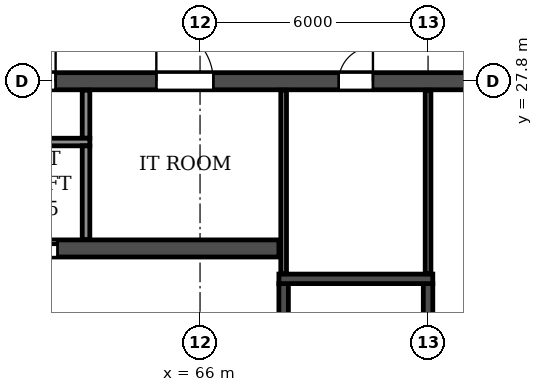
"""IFC4 building model, lengths in metres.
Left out: names, types, materials, properties, quantities, classifications, styles, units other than length and angle.
Written with IfcOpenShell. Run it as: python <this file> out.ifc"""

import sys

from ifc_helpers import new_model, si_unit, direction, frame, frame_2d, origin, place, context, subcontext, project, spatial, rectangle, extrude, element, fill, save


model = new_model("IFC4")
c1 = context("Model", 3, precision=1e-05, world=origin(), true_north=direction((0.0, 1.0)))
c2 = subcontext(c1, "Body", "Model", "MODEL_VIEW")
j1 = project(units=[si_unit("LENGTHUNIT", "METRE"), si_unit("PLANEANGLEUNIT", "RADIAN")], contexts=[c1])
p1 = place(None, origin())
s1 = spatial("IfcSite", under=j1, at=p1, CompositionType="ELEMENT")
p2 = place(p1, origin())
s2 = spatial("IfcBuilding", under=s1, at=p2, CompositionType="ELEMENT")
p3 = place(p2, frame((0.0, 0.0, 125.7)))
s3 = spatial("IfcBuildingStorey", under=s2, at=p3, CompositionType="ELEMENT", Elevation=125.7)
p4 = place(p3, frame((12.2, 27.8, 0.0), z_axis=(0.0, 0.0, 1.0), x_axis=(1.0, 0.0, 0.0)))
e1 = element("IfcWall", 1, at=p4, inside=s3, PredefinedType="SOLIDWALL", context=c2, shape_type="SweptSolid", body=[
    extrude(rectangle(XDim=77.6, YDim=0.45, at=frame_2d((38.8, 0.0))), origin(), (0.0, 0.0, 1.0), 3.07),
])
p5 = place(p4, frame((0.8, 0.0, 0.0)))
e2 = element("IfcOpeningElement", 2, at=p5, cuts=e1, PredefinedType="OPENING", context=c2, shape_type="SweptSolid", body=[
    extrude(rectangle(XDim=1.0, YDim=2.1, at=frame_2d((0.5, 1.05))), frame((0.0, 0.235, 0.0), z_axis=(0.0, -1.0, 0.0), x_axis=(1.0, 0.0, 0.0)), (0.0, 0.0, 1.0), 0.47),
])
p6 = place(p4, frame((3.8, 0.0, 0.0)))
e3 = element("IfcOpeningElement", 3, at=p6, cuts=e1, PredefinedType="OPENING", context=c2, shape_type="SweptSolid", body=[
    extrude(rectangle(XDim=1.0, YDim=2.1, at=frame_2d((0.5, 1.05))), frame((0.0, 0.235, 0.0), z_axis=(0.0, -1.0, 0.0), x_axis=(1.0, 0.0, 0.0)), (0.0, 0.0, 1.0), 0.47),
])
p7 = place(p4, frame((6.7, 0.0, 0.0)))
e4 = element("IfcOpeningElement", 4, at=p7, cuts=e1, PredefinedType="OPENING", context=c2, shape_type="SweptSolid", body=[
    extrude(rectangle(XDim=1.0, YDim=2.1, at=frame_2d((0.5, 1.05))), frame((0.0, 0.235, 0.0), z_axis=(0.0, -1.0, 0.0), x_axis=(1.0, 0.0, 0.0)), (0.0, 0.0, 1.0), 0.47),
])
p8 = place(p4, frame((10.05, 0.0, 0.0)))
e5 = element("IfcOpeningElement", 5, at=p8, cuts=e1, PredefinedType="OPENING", context=c2, shape_type="SweptSolid", body=[
    extrude(rectangle(XDim=0.9, YDim=2.1, at=frame_2d((0.45, 1.05))), frame((0.0, 0.235, 0.0), z_axis=(0.0, -1.0, 0.0), x_axis=(1.0, 0.0, 0.0)), (0.0, 0.0, 1.0), 0.47),
])
p9 = place(p4, frame((19.25, 0.0, 0.0)))
e6 = element("IfcOpeningElement", 6, at=p9, cuts=e1, PredefinedType="OPENING", context=c2, shape_type="SweptSolid", body=[
    extrude(rectangle(XDim=0.9, YDim=2.1, at=frame_2d((0.45, 1.05))), frame((0.0, 0.235, 0.0), z_axis=(0.0, -1.0, 0.0), x_axis=(1.0, 0.0, 0.0)), (0.0, 0.0, 1.0), 0.47),
])
p10 = place(p4, frame((25.0, 0.0, 0.0)))
e7 = element("IfcOpeningElement", 7, at=p10, cuts=e1, PredefinedType="OPENING", context=c2, shape_type="SweptSolid", body=[
    extrude(rectangle(XDim=1.0, YDim=2.1, at=frame_2d((0.5, 1.05))), frame((0.0, 0.235, 0.0), z_axis=(0.0, -1.0, 0.0), x_axis=(1.0, 0.0, 0.0)), (0.0, 0.0, 1.0), 0.47),
])
p11 = place(p4, frame((30.2, 0.0, 0.0)))
e8 = element("IfcOpeningElement", 8, at=p11, cuts=e1, PredefinedType="OPENING", context=c2, shape_type="SweptSolid", body=[
    extrude(rectangle(XDim=1.0, YDim=2.1, at=frame_2d((0.5, 1.05))), frame((0.0, 0.235, 0.0), z_axis=(0.0, -1.0, 0.0), x_axis=(1.0, 0.0, 0.0)), (0.0, 0.0, 1.0), 0.47),
])
p12 = place(p4, frame((35.4, 0.0, 0.0)))
e9 = element("IfcOpeningElement", 9, at=p12, cuts=e1, PredefinedType="OPENING", context=c2, shape_type="SweptSolid", body=[
    extrude(rectangle(XDim=1.0, YDim=2.1, at=frame_2d((0.5, 1.05))), frame((0.0, 0.235, 0.0), z_axis=(0.0, -1.0, 0.0), x_axis=(1.0, 0.0, 0.0)), (0.0, 0.0, 1.0), 0.47),
])
p13 = place(p4, frame((38.3, 0.0, 0.0)))
e10 = element("IfcOpeningElement", 10, at=p13, cuts=e1, PredefinedType="OPENING", context=c2, shape_type="SweptSolid", body=[
    extrude(rectangle(XDim=1.0, YDim=2.1, at=frame_2d((0.5, 1.05))), frame((0.0, 0.235, 0.0), z_axis=(0.0, -1.0, 0.0), x_axis=(1.0, 0.0, 0.0)), (0.0, 0.0, 1.0), 0.47),
])
p14 = place(p4, frame((42.5, 0.0, 0.0)))
e11 = element("IfcOpeningElement", 11, at=p14, cuts=e1, PredefinedType="OPENING", context=c2, shape_type="SweptSolid", body=[
    extrude(rectangle(XDim=1.0, YDim=2.1, at=frame_2d((0.5, 1.05))), frame((0.0, 0.235, 0.0), z_axis=(0.0, -1.0, 0.0), x_axis=(1.0, 0.0, 0.0)), (0.0, 0.0, 1.0), 0.47),
])
p15 = place(p4, frame((46.4, 0.0, 0.0)))
e12 = element("IfcOpeningElement", 12, at=p15, cuts=e1, PredefinedType="OPENING", context=c2, shape_type="SweptSolid", body=[
    extrude(rectangle(XDim=1.0, YDim=2.1, at=frame_2d((0.5, 1.05))), frame((0.0, 0.235, 0.0), z_axis=(0.0, -1.0, 0.0), x_axis=(1.0, 0.0, 0.0)), (0.0, 0.0, 1.0), 0.47),
])
p16 = place(p4, frame((49.0, 0.0, 0.0)))
e13 = element("IfcOpeningElement", 13, at=p16, cuts=e1, PredefinedType="OPENING", context=c2, shape_type="SweptSolid", body=[
    extrude(rectangle(XDim=1.0, YDim=2.1, at=frame_2d((0.5, 1.05))), frame((0.0, 0.235, 0.0), z_axis=(0.0, -1.0, 0.0), x_axis=(1.0, 0.0, 0.0)), (0.0, 0.0, 1.0), 0.47),
])
p17 = place(p4, frame((52.65, 0.0, 0.0)))
e14 = element("IfcOpeningElement", 14, at=p17, cuts=e1, PredefinedType="OPENING", context=c2, shape_type="SweptSolid", body=[
    extrude(rectangle(XDim=1.5, YDim=2.1, at=frame_2d((0.75, 1.05))), frame((0.0, 0.235, 0.0), z_axis=(0.0, -1.0, 0.0), x_axis=(1.0, 0.0, 0.0)), (0.0, 0.0, 1.0), 0.47),
])
p18 = place(p4, frame((57.45, 0.0, 0.0)))
e15 = element("IfcOpeningElement", 15, at=p18, cuts=e1, PredefinedType="OPENING", context=c2, shape_type="SweptSolid", body=[
    extrude(rectangle(XDim=0.9, YDim=2.1, at=frame_2d((0.45, 1.05))), frame((0.0, 0.235, 0.0), z_axis=(0.0, -1.0, 0.0), x_axis=(1.0, 0.0, 0.0)), (0.0, 0.0, 1.0), 0.47),
])
p19 = place(p4, frame((66.65, 0.0, 0.0)))
e16 = element("IfcOpeningElement", 16, at=p19, cuts=e1, PredefinedType="OPENING", context=c2, shape_type="SweptSolid", body=[
    extrude(rectangle(XDim=0.9, YDim=2.1, at=frame_2d((0.45, 1.05))), frame((0.0, 0.235, 0.0), z_axis=(0.0, -1.0, 0.0), x_axis=(1.0, 0.0, 0.0)), (0.0, 0.0, 1.0), 0.47),
])
p20 = place(p4, frame((69.9, 0.0, 0.0)))
e17 = element("IfcOpeningElement", 17, at=p20, cuts=e1, PredefinedType="OPENING", context=c2, shape_type="SweptSolid", body=[
    extrude(rectangle(XDim=1.0, YDim=2.1, at=frame_2d((0.5, 1.05))), frame((0.0, 0.235, 0.0), z_axis=(0.0, -1.0, 0.0), x_axis=(1.0, 0.0, 0.0)), (0.0, 0.0, 1.0), 0.47),
])
p21 = place(p4, frame((72.8, 0.0, 0.0)))
e18 = element("IfcOpeningElement", 18, at=p21, cuts=e1, PredefinedType="OPENING", context=c2, shape_type="SweptSolid", body=[
    extrude(rectangle(XDim=1.0, YDim=2.1, at=frame_2d((0.5, 1.05))), frame((0.0, 0.235, 0.0), z_axis=(0.0, -1.0, 0.0), x_axis=(1.0, 0.0, 0.0)), (0.0, 0.0, 1.0), 0.47),
])
p22 = place(p4, frame((75.8, 0.0, 0.0)))
e19 = element("IfcOpeningElement", 19, at=p22, cuts=e1, PredefinedType="OPENING", context=c2, shape_type="SweptSolid", body=[
    extrude(rectangle(XDim=1.0, YDim=2.1, at=frame_2d((0.5, 1.05))), frame((0.0, 0.235, 0.0), z_axis=(0.0, -1.0, 0.0), x_axis=(1.0, 0.0, 0.0)), (0.0, 0.0, 1.0), 0.47),
])
p23 = place(p3, frame((33.925, 23.4, 0.0), z_axis=(0.0, 0.0, 1.0), x_axis=(1.0, 0.0, 0.0)))
e20 = element("IfcWall", 20, at=p23, inside=s3, PredefinedType="SOLIDWALL", context=c2, shape_type="SweptSolid", body=[
    extrude(rectangle(XDim=34.15, YDim=0.45, at=frame_2d((17.075, 0.0))), origin(), (0.0, 0.0, 1.0), 3.07),
])
p24 = place(p23, frame((16.175, 0.0, 0.0)))
e21 = element("IfcOpeningElement", 21, at=p24, cuts=e20, PredefinedType="OPENING", context=c2, shape_type="SweptSolid", body=[
    extrude(rectangle(XDim=1.8, YDim=2.1, at=frame_2d((0.9, 1.05))), frame((0.0, 0.235, 0.0), z_axis=(0.0, -1.0, 0.0), x_axis=(1.0, 0.0, 0.0)), (0.0, 0.0, 1.0), 0.47),
])
p25 = place(p23, frame((0.625, 0.0, 0.0)))
e22 = element("IfcOpeningElement", 22, at=p25, cuts=e20, PredefinedType="OPENING", context=c2, shape_type="SweptSolid", body=[
    extrude(rectangle(XDim=1.1, YDim=2.1, at=frame_2d((0.55, 1.05))), frame((0.0, 0.235, 0.0), z_axis=(0.0, -1.0, 0.0), x_axis=(1.0, 0.0, 0.0)), (0.0, 0.0, 1.0), 0.47),
])
p26 = place(p23, frame((3.225, 0.0, 0.0)))
e23 = element("IfcOpeningElement", 23, at=p26, cuts=e20, PredefinedType="OPENING", context=c2, shape_type="SweptSolid", body=[
    extrude(rectangle(XDim=1.1, YDim=2.1, at=frame_2d((0.55, 1.05))), frame((0.0, 0.235, 0.0), z_axis=(0.0, -1.0, 0.0), x_axis=(1.0, 0.0, 0.0)), (0.0, 0.0, 1.0), 0.47),
])
p27 = place(p23, frame((5.825, 0.0, 0.0)))
e24 = element("IfcOpeningElement", 24, at=p27, cuts=e20, PredefinedType="OPENING", context=c2, shape_type="SweptSolid", body=[
    extrude(rectangle(XDim=1.1, YDim=2.1, at=frame_2d((0.55, 1.05))), frame((0.0, 0.235, 0.0), z_axis=(0.0, -1.0, 0.0), x_axis=(1.0, 0.0, 0.0)), (0.0, 0.0, 1.0), 0.47),
])
p28 = place(p23, frame((8.425, 0.0, 0.0)))
e25 = element("IfcOpeningElement", 25, at=p28, cuts=e20, PredefinedType="OPENING", context=c2, shape_type="SweptSolid", body=[
    extrude(rectangle(XDim=1.1, YDim=2.1, at=frame_2d((0.55, 1.05))), frame((0.0, 0.235, 0.0), z_axis=(0.0, -1.0, 0.0), x_axis=(1.0, 0.0, 0.0)), (0.0, 0.0, 1.0), 0.47),
])
p29 = place(p23, frame((11.025, 0.0, 0.0)))
e26 = element("IfcOpeningElement", 26, at=p29, cuts=e20, PredefinedType="OPENING", context=c2, shape_type="SweptSolid", body=[
    extrude(rectangle(XDim=1.1, YDim=2.1, at=frame_2d((0.55, 1.05))), frame((0.0, 0.235, 0.0), z_axis=(0.0, -1.0, 0.0), x_axis=(1.0, 0.0, 0.0)), (0.0, 0.0, 1.0), 0.47),
])
p30 = place(p23, frame((13.625, 0.0, 0.0)))
e27 = element("IfcOpeningElement", 27, at=p30, cuts=e20, PredefinedType="OPENING", context=c2, shape_type="SweptSolid", body=[
    extrude(rectangle(XDim=1.1, YDim=2.1, at=frame_2d((0.55, 1.05))), frame((0.0, 0.235, 0.0), z_axis=(0.0, -1.0, 0.0), x_axis=(1.0, 0.0, 0.0)), (0.0, 0.0, 1.0), 0.47),
])
p31 = place(p23, frame((27.225, 0.0, 0.0)))
e28 = element("IfcOpeningElement", 28, at=p31, cuts=e20, PredefinedType="OPENING", context=c2, shape_type="SweptSolid", body=[
    extrude(rectangle(XDim=1.1, YDim=2.1, at=frame_2d((0.55, 1.05))), frame((0.0, 0.235, 0.0), z_axis=(0.0, -1.0, 0.0), x_axis=(1.0, 0.0, 0.0)), (0.0, 0.0, 1.0), 0.47),
])
p32 = place(p3, frame((68.2, 14.825, 0.0), z_axis=(0.0, 0.0, 1.0), x_axis=(0.0, 1.0, 0.0)))
e29 = element("IfcWall", 29, at=p32, inside=s3, PredefinedType="SOLIDWALL", context=c2, shape_type="SweptSolid", body=[
    extrude(rectangle(XDim=7.65, YDim=0.25, at=frame_2d((3.825, 0.0))), origin(), (0.0, 0.0, 1.0), 3.07),
])
p33 = place(p32, frame((0.475, 0.0, 0.0)))
e30 = element("IfcOpeningElement", 30, at=p33, cuts=e29, PredefinedType="OPENING", context=c2, shape_type="SweptSolid", body=[
    extrude(rectangle(XDim=1.0, YDim=2.1, at=frame_2d((0.5, 1.05))), frame((0.0, 0.135, 0.0), z_axis=(0.0, -1.0, 0.0), x_axis=(1.0, 0.0, 0.0)), (0.0, 0.0, 1.0), 0.27),
])
p34 = place(p3, frame((72.0, 14.825, 0.0), z_axis=(0.0, 0.0, 1.0), x_axis=(0.0, 1.0, 0.0)))
e31 = element("IfcWall", 31, at=p34, inside=s3, PredefinedType="SOLIDWALL", context=c2, shape_type="SweptSolid", body=[
    extrude(rectangle(XDim=7.65, YDim=0.25, at=frame_2d((3.825, 0.0))), origin(), (0.0, 0.0, 1.0), 3.07),
])
p35 = place(p3, frame((68.075, 22.6, 0.0), z_axis=(0.0, 0.0, 1.0), x_axis=(1.0, 0.0, 0.0)))
e32 = element("IfcWall", 32, at=p35, inside=s3, PredefinedType="SOLIDWALL", context=c2, shape_type="SweptSolid", body=[
    extrude(rectangle(XDim=4.05, YDim=0.25, at=frame_2d((2.025, 0.0))), origin(), (0.0, 0.0, 1.0), 3.07),
])
p36 = place(p3, frame((63.0, 26.3, 0.0), z_axis=(0.0, 0.0, 1.0), x_axis=(0.0, 1.0, 0.0)))
e33 = element("IfcWall", 33, at=p36, inside=s3, PredefinedType="PARTITIONING", context=c2, shape_type="SweptSolid", body=[
    extrude(rectangle(XDim=1.265, YDim=0.2, at=frame_2d((0.632, 0.0))), origin(), (0.0, 0.0, 1.0), 3.07),
])
for number, where, z_axis, x_axis in (
    (34, (68.2, 22.735, 0.0), (0.0, 0.0, 1.0), (0.0, 1.0, 0.0)),
    (35, (72.0, 22.735, 0.0), (0.0, 0.0, 1.0), (0.0, 1.0, 0.0)),
):
    element("IfcWall", number, at=place(p3, frame(where, z_axis=z_axis, x_axis=x_axis)), inside=s3, PredefinedType="PARTITIONING", context=c2, shape_type="SweptSolid", body=[
        extrude(rectangle(XDim=4.83, YDim=0.15, at=frame_2d((2.415, 0.0))), origin(), (0.0, 0.0, 1.0), 3.07),
    ])
p37 = place(p3, frame((57.7, 26.2, 0.0), z_axis=(0.0, 0.0, 1.0), x_axis=(1.0, 0.0, 0.0)))
e36 = element("IfcWall", 36, at=p37, inside=s3, PredefinedType="PARTITIONING", context=c2, shape_type="SweptSolid", body=[
    extrude(rectangle(XDim=5.4, YDim=0.2, at=frame_2d((2.7, 0.0))), origin(), (0.0, 0.0, 1.0), 3.07),
])
p38 = place(p3, frame((63.0, 23.635, 0.0), z_axis=(0.0, 0.0, 1.0), x_axis=(0.0, 1.0, 0.0)))
e37 = element("IfcWall", 37, at=p38, inside=s3, PredefinedType="PARTITIONING", context=c2, shape_type="SweptSolid", body=[
    extrude(rectangle(XDim=2.465, YDim=0.2, at=frame_2d((1.232, 0.0))), origin(), (0.0, 0.0, 1.0), 3.07),
])
p39 = place(p16, origin())
e38 = element("IfcDoor", 38, at=p39, inside=s3, OperationType="SINGLE_SWING_RIGHT", PredefinedType="DOOR", context=c2, shape_type="SweptSolid", body=[
    extrude(rectangle(XDim=1.0, YDim=2.1, at=frame_2d((0.5, 1.05))), frame((0.0, 0.025, 0.0), z_axis=(0.0, -1.0, 0.0), x_axis=(1.0, 0.0, 0.0)), (0.0, 0.0, 1.0), 0.05),
])
fill(e13, e38)
p40 = place(p17, origin())
e39 = element("IfcDoor", 39, at=p40, inside=s3, OperationType="DOUBLE_DOOR_SINGLE_SWING", PredefinedType="DOOR", context=c2, shape_type="SweptSolid", body=[
    extrude(rectangle(XDim=1.5, YDim=2.1, at=frame_2d((0.75, 1.05))), frame((0.0, 0.025, 0.0), z_axis=(0.0, -1.0, 0.0), x_axis=(1.0, 0.0, 0.0)), (0.0, 0.0, 1.0), 0.05),
])
fill(e14, e39)
p41 = place(p18, origin())
e40 = element("IfcDoor", 40, at=p41, inside=s3, OperationType="SINGLE_SWING_RIGHT", PredefinedType="DOOR", context=c2, shape_type="SweptSolid", body=[
    extrude(rectangle(XDim=0.9, YDim=2.1, at=frame_2d((0.45, 1.05))), frame((0.0, 0.025, 0.0), z_axis=(0.0, -1.0, 0.0), x_axis=(1.0, 0.0, 0.0)), (0.0, 0.0, 1.0), 0.05),
])
fill(e15, e40)
p42 = place(p31, origin())
e41 = element("IfcDoor", 41, at=p42, inside=s3, OperationType="DOUBLE_DOOR_SLIDING", PredefinedType="DOOR", context=c2, shape_type="SweptSolid", body=[
    extrude(rectangle(XDim=1.1, YDim=2.1, at=frame_2d((0.55, 1.05))), frame((0.0, 0.025, 0.0), z_axis=(0.0, -1.0, 0.0), x_axis=(1.0, 0.0, 0.0)), (0.0, 0.0, 1.0), 0.05),
])
fill(e28, e41)
save(model, sys.argv[1])
